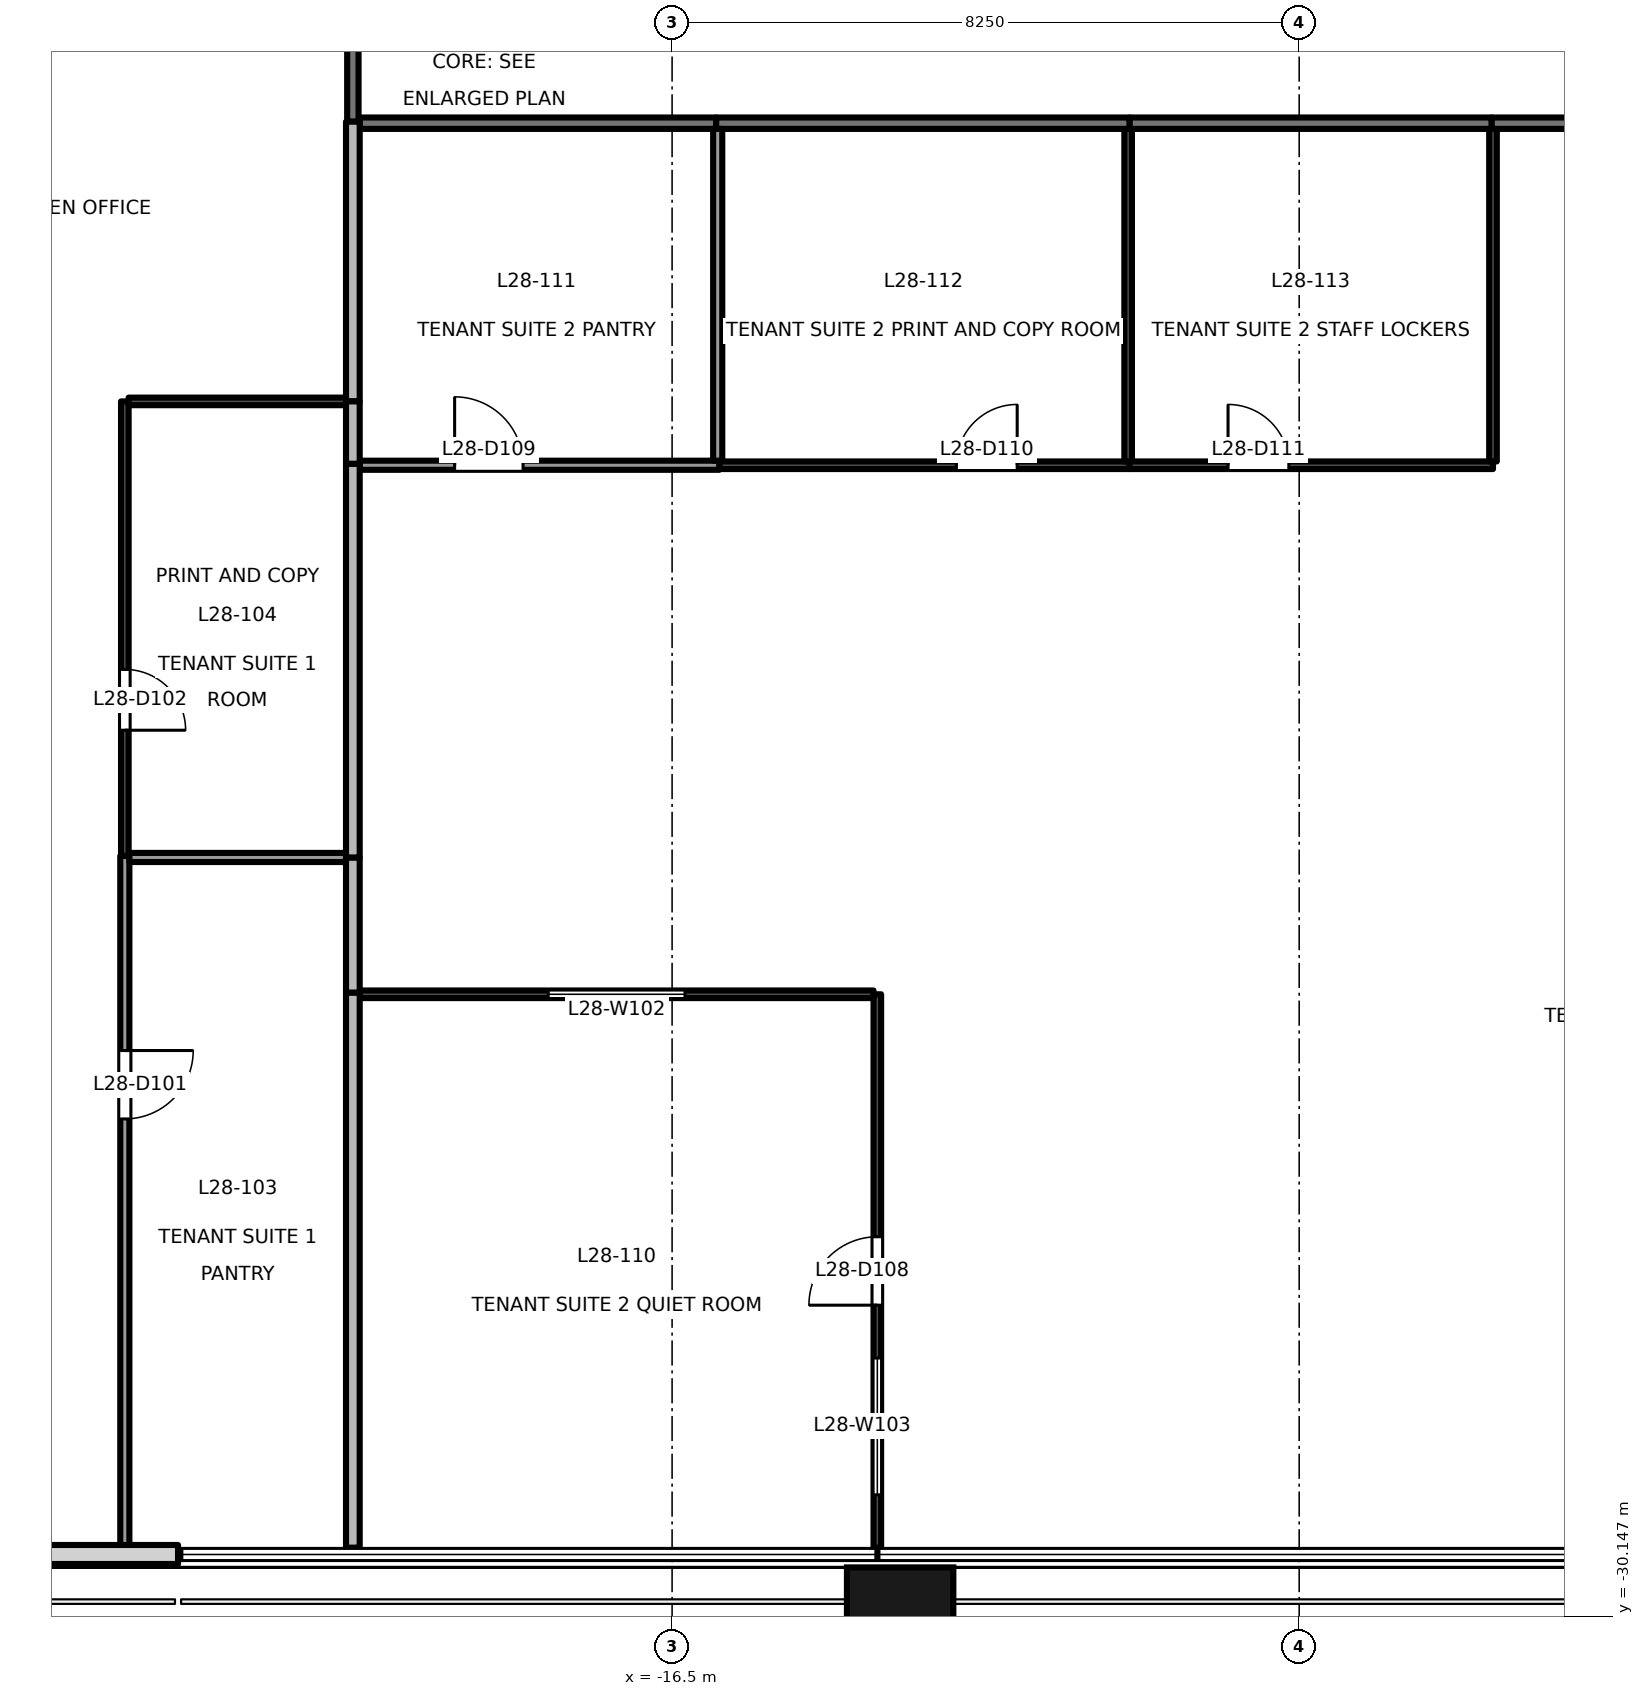
"""IFC4 building model, lengths in metres.
Left out: names, types, materials, properties, quantities, classifications, styles, units other than length and angle.
Written with IfcOpenShell. Run it as: python <this file> out.ifc"""

import sys

from ifc_helpers import new_model, si_unit, direction, frame, frame_2d, origin, origin_2d, place, context, subcontext, project, spatial, rectangle, extrude, element, fill, save


model = new_model("IFC4")
c1 = context("Model", 3, precision=1e-05, world=origin(), true_north=direction((0.0, 1.0)))
c2 = subcontext(c1, "Body", "Model", "MODEL_VIEW")
j1 = project(units=[si_unit("LENGTHUNIT", "METRE"), si_unit("PLANEANGLEUNIT", "RADIAN")], contexts=[c1])
p1 = place(None, origin())
s1 = spatial("IfcSite", under=j1, at=p1, CompositionType="ELEMENT")
p2 = place(p1, origin())
s2 = spatial("IfcBuilding", under=s1, at=p2, CompositionType="ELEMENT")
p3 = place(p2, frame((0.0, 0.0, 126.1)))
s3 = spatial("IfcBuildingStorey", under=s2, at=p3, CompositionType="ELEMENT", Elevation=126.1)
p4 = place(p3, frame((-13.5, -30.4, -0.2), z_axis=(0.0, 0.0, 1.0), x_axis=(1.0, 0.0, 0.0)))
e1 = element("IfcColumn", 1, at=p4, inside=s3, PredefinedType="COLUMN", context=c2, shape_type="SweptSolid", body=[
    extrude(rectangle(XDim=1.4, YDim=1.8, at=origin_2d()), origin(), (0.0, 0.0, 1.0), 4.0),
])
p5 = place(p3, frame((-25.955, -29.33, 0.0), z_axis=(0.0, 0.0, 1.0), x_axis=(1.0, 0.0, 0.0)))
e2 = element("IfcWall", 2, at=p5, inside=s3, PredefinedType="SOLIDWALL", context=c2, shape_type="SweptSolid", body=[
    extrude(rectangle(XDim=2.955, YDim=0.25, at=frame_2d((1.478, 0.0))), origin(), (0.0, 0.0, 1.0), 3.8),
])
p6 = place(p3, frame((-20.7, -10.48, 0.0), z_axis=(0.0, 0.0, 1.0), x_axis=(0.0, 1.0, 0.0)))
e3 = element("IfcWall", 3, at=p6, inside=s3, PredefinedType="PARTITIONING", context=c2, shape_type="SweptSolid", body=[
    extrude(rectangle(XDim=2.3, YDim=0.15, at=frame_2d((1.15, 0.0))), origin(), (0.0, 0.0, 1.0), 3.8),
])
p7 = place(p3, frame((0.32, -10.5, 0.0), z_axis=(0.0, 0.0, 1.0), x_axis=(-1.0, 0.0, 0.0)))
e4 = element("IfcWall", 4, at=p7, inside=s3, PredefinedType="PARTITIONING", context=c2, shape_type="SweptSolid", body=[
    extrude(rectangle(XDim=6.04, YDim=0.15, at=frame_2d((3.02, 0.0))), origin(), (0.0, 0.0, 1.0), 2.9),
])
p8 = place(p7, frame((2.12, 0.0, 0.0)))
e5 = element("IfcOpeningElement", 5, at=p8, cuts=e4, PredefinedType="OPENING", context=c2, shape_type="SweptSolid", body=[
    extrude(rectangle(XDim=1.8, YDim=2.1, at=frame_2d((0.9, 1.05))), frame((0.0, 0.085, 0.0), z_axis=(0.0, -1.0, 0.0), x_axis=(1.0, 0.0, 0.0)), (0.0, 0.0, 1.0), 0.171),
])
p9 = place(p3, frame((-15.92, -10.5, 0.0), z_axis=(0.0, 0.0, 1.0), x_axis=(-1.0, 0.0, 0.0)))
e6 = element("IfcWall", 6, at=p9, inside=s3, PredefinedType="PARTITIONING", context=c2, shape_type="SweptSolid", body=[
    extrude(rectangle(XDim=4.69, YDim=0.15, at=frame_2d((2.345, 0.0))), origin(), (0.0, 0.0, 1.0), 3.8),
])
p10 = place(p3, frame((-10.48, -10.5, 0.0), z_axis=(0.0, 0.0, 1.0), x_axis=(-1.0, 0.0, 0.0)))
e7 = element("IfcWall", 7, at=p10, inside=s3, PredefinedType="PARTITIONING", context=c2, shape_type="SweptSolid", body=[
    extrude(rectangle(XDim=5.44, YDim=0.15, at=frame_2d((2.72, 0.0))), origin(), (0.0, 0.0, 1.0), 2.9),
])
p11 = place(p3, frame((-5.72, -10.5, 0.0), z_axis=(0.0, 0.0, 1.0), x_axis=(-1.0, 0.0, 0.0)))
e8 = element("IfcWall", 8, at=p11, inside=s3, PredefinedType="PARTITIONING", context=c2, shape_type="SweptSolid", body=[
    extrude(rectangle(XDim=4.76, YDim=0.15, at=frame_2d((2.38, 0.0))), origin(), (0.0, 0.0, 1.0), 2.9),
])
p12 = place(p3, frame((-23.7, -20.14, 0.0), z_axis=(0.0, 0.0, 1.0), x_axis=(0.0, -1.0, 0.0)))
e9 = element("IfcWall", 9, at=p12, inside=s3, PredefinedType="PARTITIONING", context=c2, shape_type="SweptSolid", body=[
    extrude(rectangle(XDim=9.1, YDim=0.12, at=frame_2d((4.55, 0.0))), origin(), (0.0, 0.0, 1.0), 3.8),
])
p13 = place(p12, frame((2.56, 0.0, 0.0)))
e10 = element("IfcOpeningElement", 10, at=p13, cuts=e9, PredefinedType="OPENING", context=c2, shape_type="SweptSolid", body=[
    extrude(rectangle(XDim=0.9, YDim=2.1, at=frame_2d((0.45, 1.05))), frame((0.0, 0.071, 0.0), z_axis=(0.0, -1.0, 0.0), x_axis=(1.0, 0.0, 0.0)), (0.0, 0.0, 1.0), 0.141),
])
p14 = place(p3, frame((-23.7, -14.16, 0.0), z_axis=(0.0, 0.0, 1.0), x_axis=(0.0, -1.0, 0.0)))
e11 = element("IfcWall", 11, at=p14, inside=s3, PredefinedType="PARTITIONING", context=c2, shape_type="SweptSolid", body=[
    extrude(rectangle(XDim=5.98, YDim=0.1, at=frame_2d((2.99, 0.0))), origin(), (0.0, 0.0, 1.0), 3.8),
])
p15 = place(p14, frame((3.526, 0.0, 0.0)))
e12 = element("IfcOpeningElement", 12, at=p15, cuts=e11, PredefinedType="OPENING", context=c2, shape_type="SweptSolid", body=[
    extrude(rectangle(XDim=0.8, YDim=2.1, at=frame_2d((0.4, 1.05))), frame((0.0, 0.061, 0.0), z_axis=(0.0, -1.0, 0.0), x_axis=(1.0, 0.0, 0.0)), (0.0, 0.0, 1.0), 0.121),
])
p16 = place(p3, frame((-20.79, -14.16, 0.0), z_axis=(0.0, 0.0, 1.0), x_axis=(-1.0, 0.0, 0.0)))
e13 = element("IfcWall", 13, at=p16, inside=s3, PredefinedType="PARTITIONING", context=c2, shape_type="SweptSolid", body=[
    extrude(rectangle(XDim=2.86, YDim=0.1, at=frame_2d((1.43, 0.0))), origin(), (0.0, 0.0, 1.0), 3.8),
])
p17 = place(p3, frame((-20.7, -10.48, 0.0), z_axis=(0.0, 0.0, 1.0), x_axis=(0.0, -1.0, 0.0)))
e14 = element("IfcWall", 14, at=p17, inside=s3, PredefinedType="PARTITIONING", context=c2, shape_type="SweptSolid", body=[
    extrude(rectangle(XDim=3.68, YDim=0.18, at=frame_2d((1.84, 0.0))), origin(), (0.0, 0.0, 1.0), 3.8),
])
p18 = place(p3, frame((-23.64, -20.16, 0.0), z_axis=(0.0, 0.0, 1.0), x_axis=(1.0, 0.0, 0.0)))
e15 = element("IfcWall", 15, at=p18, inside=s3, PredefinedType="PARTITIONING", context=c2, shape_type="SweptSolid", body=[
    extrude(rectangle(XDim=2.85, YDim=0.12, at=frame_2d((1.425, 0.0))), origin(), (0.0, 0.0, 1.0), 3.8),
])
p19 = place(p3, frame((-20.7, -20.16, 0.0), z_axis=(0.0, 0.0, 1.0), x_axis=(0.0, -1.0, 0.0)))
e16 = element("IfcWall", 16, at=p19, inside=s3, PredefinedType="PARTITIONING", context=c2, shape_type="SweptSolid", body=[
    extrude(rectangle(XDim=1.78, YDim=0.18, at=frame_2d((0.89, 0.0))), origin(), (0.0, 0.0, 1.0), 3.8),
])
p20 = place(p3, frame((-20.7, -21.94, 0.0), z_axis=(0.0, 0.0, 1.0), x_axis=(0.0, -1.0, 0.0)))
e17 = element("IfcWall", 17, at=p20, inside=s3, PredefinedType="PARTITIONING", context=c2, shape_type="SweptSolid", body=[
    extrude(rectangle(XDim=7.3, YDim=0.18, at=frame_2d((3.65, 0.0))), origin(), (0.0, 0.0, 1.0), 3.8),
])
p21 = place(p3, frame((-20.7, -14.98, 0.0), z_axis=(0.0, 0.0, 1.0), x_axis=(0.0, -1.0, 0.0)))
e18 = element("IfcWall", 18, at=p21, inside=s3, PredefinedType="PARTITIONING", context=c2, shape_type="SweptSolid", body=[
    extrude(rectangle(XDim=5.18, YDim=0.18, at=frame_2d((2.59, 0.0))), origin(), (0.0, 0.0, 1.0), 3.8),
])
p22 = place(p3, frame((-20.7, -14.16, 0.0), z_axis=(0.0, 0.0, 1.0), x_axis=(0.0, -1.0, 0.0)))
e19 = element("IfcWall", 19, at=p22, inside=s3, PredefinedType="PARTITIONING", context=c2, shape_type="SweptSolid", body=[
    extrude(rectangle(XDim=0.82, YDim=0.18, at=frame_2d((0.41, 0.0))), origin(), (0.0, 0.0, 1.0), 3.8),
])
p23 = place(p3, frame((-13.85, -21.96, 0.0), z_axis=(0.0, 0.0, 1.0), x_axis=(-1.0, 0.0, 0.0)))
e20 = element("IfcWall", 20, at=p23, inside=s3, PredefinedType="PARTITIONING", context=c2, shape_type="SweptSolid", body=[
    extrude(rectangle(XDim=6.76, YDim=0.1, at=frame_2d((3.38, 0.0))), origin(), (0.0, 0.0, 1.0), 3.8),
])
p24 = place(p23, frame((2.48, 0.0, 0.9)))
e21 = element("IfcOpeningElement", 21, at=p24, cuts=e20, PredefinedType="OPENING", context=c2, shape_type="SweptSolid", body=[
    extrude(rectangle(XDim=1.8, YDim=1.2, at=frame_2d((0.9, 0.6))), frame((0.0, 0.061, 0.0), z_axis=(0.0, -1.0, 0.0), x_axis=(1.0, 0.0, 0.0)), (0.0, 0.0, 1.0), 0.121),
])
p25 = place(p3, frame((-13.8, -29.24, 0.0), z_axis=(0.0, 0.0, 1.0), x_axis=(0.0, 1.0, 0.0)))
e22 = element("IfcWall", 22, at=p25, inside=s3, PredefinedType="PARTITIONING", context=c2, shape_type="SweptSolid", body=[
    extrude(rectangle(XDim=7.28, YDim=0.1, at=frame_2d((3.64, 0.0))), origin(), (0.0, 0.0, 1.0), 3.8),
])
p26 = place(p25, frame((3.19, 0.0, 0.0)))
e23 = element("IfcOpeningElement", 23, at=p26, cuts=e22, PredefinedType="OPENING", context=c2, shape_type="SweptSolid", body=[
    extrude(rectangle(XDim=0.9, YDim=2.1, at=frame_2d((0.45, 1.05))), frame((0.0, 0.061, 0.0), z_axis=(0.0, -1.0, 0.0), x_axis=(1.0, 0.0, 0.0)), (0.0, 0.0, 1.0), 0.121),
])
p27 = place(p25, frame((0.695, 0.0, 0.9)))
e24 = element("IfcOpeningElement", 24, at=p27, cuts=e22, PredefinedType="OPENING", context=c2, shape_type="SweptSolid", body=[
    extrude(rectangle(XDim=1.8, YDim=1.2, at=frame_2d((0.9, 0.6))), frame((0.0, 0.061, 0.0), z_axis=(0.0, -1.0, 0.0), x_axis=(1.0, 0.0, 0.0)), (0.0, 0.0, 1.0), 0.121),
])
p28 = place(p3, frame((-20.61, -15.0, 0.0), z_axis=(0.0, 0.0, 1.0), x_axis=(1.0, 0.0, 0.0)))
e25 = element("IfcWall", 25, at=p28, inside=s3, PredefinedType="PARTITIONING", context=c2, shape_type="SweptSolid", body=[
    extrude(rectangle(XDim=4.73, YDim=0.12, at=frame_2d((2.365, 0.0))), origin(), (0.0, 0.0, 1.0), 3.8),
])
p29 = place(p28, frame((1.249, 0.0, 0.0)))
e26 = element("IfcOpeningElement", 26, at=p29, cuts=e25, PredefinedType="OPENING", context=c2, shape_type="SweptSolid", body=[
    extrude(rectangle(XDim=0.9, YDim=2.1, at=frame_2d((0.45, 1.05))), frame((0.0, 0.071, 0.0), z_axis=(0.0, -1.0, 0.0), x_axis=(1.0, 0.0, 0.0)), (0.0, 0.0, 1.0), 0.141),
])
p30 = place(p3, frame((-15.88, -15.0, 0.0), z_axis=(0.0, 0.0, 1.0), x_axis=(1.0, 0.0, 0.0)))
e27 = element("IfcWall", 27, at=p30, inside=s3, PredefinedType="PARTITIONING", context=c2, shape_type="SweptSolid", body=[
    extrude(rectangle(XDim=5.4, YDim=0.1, at=frame_2d((2.7, 0.0))), origin(), (0.0, 0.0, 1.0), 2.9),
])
p31 = place(p30, frame((3.12, 0.0, 0.0)))
e28 = element("IfcOpeningElement", 28, at=p31, cuts=e27, PredefinedType="OPENING", context=c2, shape_type="SweptSolid", body=[
    extrude(rectangle(XDim=0.8, YDim=2.1, at=frame_2d((0.4, 1.05))), frame((0.0, 0.061, 0.0), z_axis=(0.0, -1.0, 0.0), x_axis=(1.0, 0.0, 0.0)), (0.0, 0.0, 1.0), 0.121),
])
p32 = place(p3, frame((-10.48, -15.0, 0.0), z_axis=(0.0, 0.0, 1.0), x_axis=(1.0, 0.0, 0.0)))
e29 = element("IfcWall", 29, at=p32, inside=s3, PredefinedType="PARTITIONING", context=c2, shape_type="SweptSolid", body=[
    extrude(rectangle(XDim=4.78, YDim=0.1, at=frame_2d((2.39, 0.0))), origin(), (0.0, 0.0, 1.0), 2.9),
])
p33 = place(p32, frame((1.294, 0.0, 0.0)))
e30 = element("IfcOpeningElement", 30, at=p33, cuts=e29, PredefinedType="OPENING", context=c2, shape_type="SweptSolid", body=[
    extrude(rectangle(XDim=0.8, YDim=2.1, at=frame_2d((0.4, 1.05))), frame((0.0, 0.061, 0.0), z_axis=(0.0, -1.0, 0.0), x_axis=(1.0, 0.0, 0.0)), (0.0, 0.0, 1.0), 0.121),
])
p34 = place(p3, frame((-5.7, -14.95, 0.0), z_axis=(0.0, 0.0, 1.0), x_axis=(0.0, 1.0, 0.0)))
e31 = element("IfcWall", 31, at=p34, inside=s3, PredefinedType="PARTITIONING", context=c2, shape_type="SweptSolid", body=[
    extrude(rectangle(XDim=4.375, YDim=0.1, at=frame_2d((2.188, 0.0))), origin(), (0.0, 0.0, 1.0), 3.8),
])
p35 = place(p3, frame((-15.9, -10.575, 0.0), z_axis=(0.0, 0.0, 1.0), x_axis=(0.0, -1.0, 0.0)))
e32 = element("IfcWall", 32, at=p35, inside=s3, PredefinedType="PARTITIONING", context=c2, shape_type="SweptSolid", body=[
    extrude(rectangle(XDim=4.365, YDim=0.12, at=frame_2d((2.183, 0.0))), origin(), (0.0, 0.0, 1.0), 3.8),
])
p36 = place(p3, frame((-10.5, -10.575, 0.0), z_axis=(0.0, 0.0, 1.0), x_axis=(0.0, -1.0, 0.0)))
e33 = element("IfcWall", 33, at=p36, inside=s3, PredefinedType="PARTITIONING", context=c2, shape_type="SweptSolid", body=[
    extrude(rectangle(XDim=4.375, YDim=0.1, at=frame_2d((2.188, 0.0))), origin(), (0.0, 0.0, 1.0), 3.8),
])
p37 = place(p13, origin())
e34 = element("IfcDoor", 34, at=p37, inside=s3, OperationType="SINGLE_SWING_LEFT", PredefinedType="DOOR", context=c2, shape_type="SweptSolid", body=[
    extrude(rectangle(XDim=0.9, YDim=2.1, at=frame_2d((0.45, 1.05))), frame((0.0, 0.025, 0.0), z_axis=(0.0, -1.0, 0.0), x_axis=(1.0, 0.0, 0.0)), (0.0, 0.0, 1.0), 0.05),
])
fill(e10, e34)
p38 = place(p15, origin())
e35 = element("IfcDoor", 35, at=p38, inside=s3, OperationType="SINGLE_SWING_RIGHT", PredefinedType="DOOR", context=c2, shape_type="SweptSolid", body=[
    extrude(rectangle(XDim=0.8, YDim=2.1, at=frame_2d((0.4, 1.05))), frame((0.0, 0.025, 0.0), z_axis=(0.0, -1.0, 0.0), x_axis=(1.0, 0.0, 0.0)), (0.0, 0.0, 1.0), 0.05),
])
fill(e12, e35)
p39 = place(p26, origin())
e36 = element("IfcDoor", 36, at=p39, inside=s3, OperationType="SINGLE_SWING_LEFT", PredefinedType="DOOR", context=c2, shape_type="SweptSolid", body=[
    extrude(rectangle(XDim=0.9, YDim=2.1, at=frame_2d((0.45, 1.05))), frame((0.0, 0.025, 0.0), z_axis=(0.0, -1.0, 0.0), x_axis=(1.0, 0.0, 0.0)), (0.0, 0.0, 1.0), 0.05),
])
fill(e23, e36)
p40 = place(p29, origin())
e37 = element("IfcDoor", 37, at=p40, inside=s3, OperationType="SINGLE_SWING_LEFT", PredefinedType="DOOR", context=c2, shape_type="SweptSolid", body=[
    extrude(rectangle(XDim=0.9, YDim=2.1, at=frame_2d((0.45, 1.05))), frame((0.0, 0.025, 0.0), z_axis=(0.0, -1.0, 0.0), x_axis=(1.0, 0.0, 0.0)), (0.0, 0.0, 1.0), 0.05),
])
fill(e26, e37)
p41 = place(p31, origin())
e38 = element("IfcDoor", 38, at=p41, inside=s3, OperationType="SINGLE_SWING_RIGHT", PredefinedType="DOOR", context=c2, shape_type="SweptSolid", body=[
    extrude(rectangle(XDim=0.8, YDim=2.1, at=frame_2d((0.4, 1.05))), frame((0.0, 0.025, 0.0), z_axis=(0.0, -1.0, 0.0), x_axis=(1.0, 0.0, 0.0)), (0.0, 0.0, 1.0), 0.05),
])
fill(e28, e38)
p42 = place(p33, origin())
e39 = element("IfcDoor", 39, at=p42, inside=s3, OperationType="SINGLE_SWING_LEFT", PredefinedType="DOOR", context=c2, shape_type="SweptSolid", body=[
    extrude(rectangle(XDim=0.8, YDim=2.1, at=frame_2d((0.4, 1.05))), frame((0.0, 0.025, 0.0), z_axis=(0.0, -1.0, 0.0), x_axis=(1.0, 0.0, 0.0)), (0.0, 0.0, 1.0), 0.05),
])
fill(e30, e39)
p43 = place(p24, origin())
e40 = element("IfcWindow", 40, at=p43, inside=s3, PartitioningType="SINGLE_PANEL", PredefinedType="WINDOW", context=c2, shape_type="SweptSolid", body=[
    extrude(rectangle(XDim=1.8, YDim=1.2, at=frame_2d((0.9, 0.6))), frame((0.0, 0.03, 0.0), z_axis=(0.0, -1.0, 0.0), x_axis=(1.0, 0.0, 0.0)), (0.0, 0.0, 1.0), 0.06),
])
fill(e21, e40)
p44 = place(p27, origin())
e41 = element("IfcWindow", 41, at=p44, inside=s3, PartitioningType="SINGLE_PANEL", PredefinedType="WINDOW", context=c2, shape_type="SweptSolid", body=[
    extrude(rectangle(XDim=1.8, YDim=1.2, at=frame_2d((0.9, 0.6))), frame((0.0, 0.03, 0.0), z_axis=(0.0, -1.0, 0.0), x_axis=(1.0, 0.0, 0.0)), (0.0, 0.0, 1.0), 0.06),
])
fill(e24, e41)
save(model, sys.argv[1])
